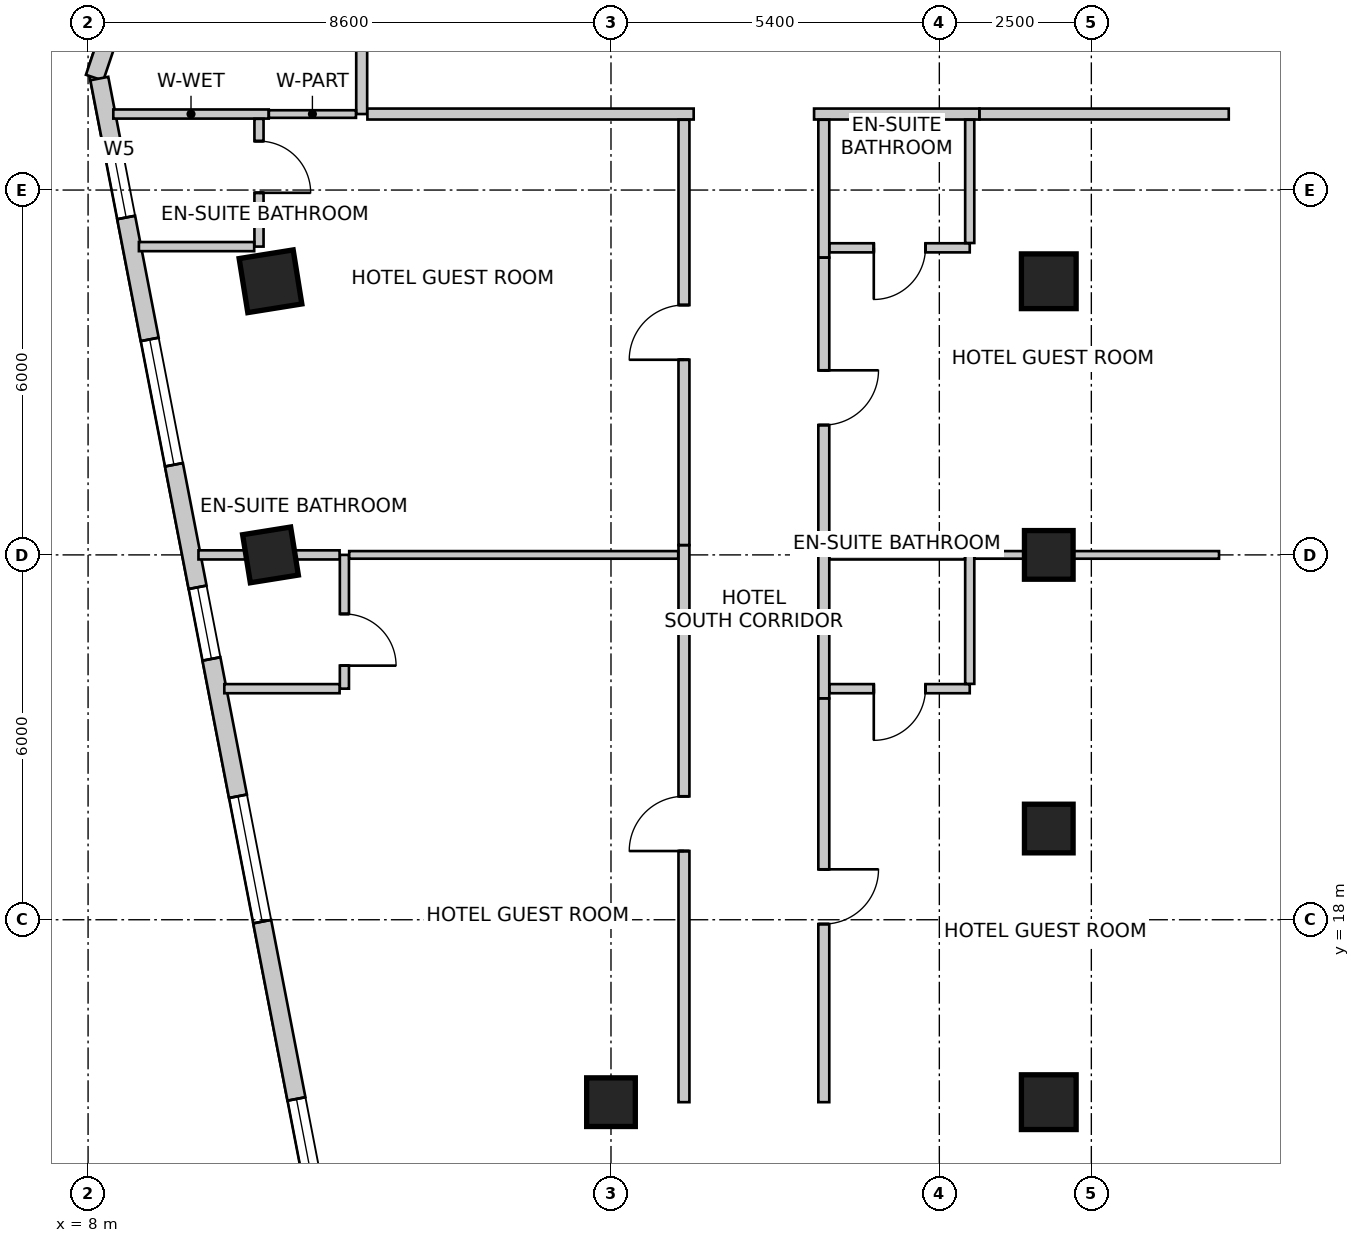
"""IFC4 building model, lengths in metres.
Left out: names, types, materials, properties, quantities, classifications, styles, units other than length and angle.
Written with IfcOpenShell. Run it as: python <this file> out.ifc"""

import sys

from ifc_helpers import new_model, si_unit, direction, frame, frame_2d, origin, origin_2d, place, context, subcontext, project, spatial, rectangle, extrude, source, transform, mapped, element, fill, save


model = new_model("IFC4")
c1 = context("Model", 3, precision=1e-05, world=origin(), true_north=direction((0.0, 1.0)))
c2 = subcontext(c1, "Body", "Model", "MODEL_VIEW")
j1 = project(units=[si_unit("LENGTHUNIT", "METRE"), si_unit("PLANEANGLEUNIT", "RADIAN")], contexts=[c1])
p1 = place(None, origin())
s1 = spatial("IfcSite", under=j1, at=p1, CompositionType="ELEMENT")
p2 = place(p1, origin())
s2 = spatial("IfcBuilding", under=s1, at=p2, CompositionType="ELEMENT")
p3 = place(p2, frame((0.0, 0.0, 110.6)))
s3 = spatial("IfcBuildingStorey", under=s2, at=p3, CompositionType="ELEMENT", Elevation=110.6)
m1 = source(origin(), c2, "Body", "SweptSolid", [
    extrude(rectangle(XDim=0.9, YDim=0.9, at=origin_2d()), origin(), (0.0, 0.0, 1.0), 3.6),
])
p4 = place(p3, frame((11.0, 28.5, 0.0), z_axis=(0.0, 0.0, 1.0), x_axis=(0.158158067254, -0.987413806751, 0.0)))
e1 = element("IfcColumn", 1, at=p4, inside=s3, PredefinedType="COLUMN", context=c2, shape_type="MappedRepresentation", body=[
    mapped(m1, transform((0.0, 0.0, 0.0), scale=1.0)),
])
m2 = source(origin(), c2, "Body", "SweptSolid", [
    extrude(rectangle(XDim=0.8, YDim=0.8, at=origin_2d()), origin(), (0.0, 0.0, 1.0), 3.6),
])
p5 = place(p3, frame((11.0, 24.0, 0.0), z_axis=(0.0, 0.0, 1.0), x_axis=(0.158158067254, -0.987413806751, 0.0)))
e2 = element("IfcColumn", 2, at=p5, inside=s3, PredefinedType="COLUMN", context=c2, shape_type="MappedRepresentation", body=[
    mapped(m2, transform((0.0, 0.0, 0.0), scale=1.0)),
])
p6 = place(p3, frame((23.8, 28.5, 0.0), z_axis=(0.0, 0.0, 1.0), x_axis=(1.0, 0.0, 0.0)))
e3 = element("IfcColumn", 3, at=p6, inside=s3, PredefinedType="COLUMN", context=c2, shape_type="MappedRepresentation", body=[
    mapped(m1, transform((0.0, 0.0, 0.0), scale=1.0)),
])
for number, where, z_axis, x_axis in (
    (4, (23.8, 24.0, 0.0), (0.0, 0.0, 1.0), (1.0, 0.0, 0.0)),
    (5, (23.8, 19.5, 0.0), (0.0, 0.0, 1.0), (1.0, 0.0, 0.0)),
):
    element("IfcColumn", number, at=place(p3, frame(where, z_axis=z_axis, x_axis=x_axis)), inside=s3, PredefinedType="COLUMN", context=c2, shape_type="MappedRepresentation", body=[
        mapped(m2, transform((0.0, 0.0, 0.0), scale=1.0)),
    ])
p7 = place(p3, frame((23.8, 15.0, 0.0), z_axis=(0.0, 0.0, 1.0), x_axis=(1.0, 0.0, 0.0)))
e6 = element("IfcColumn", 6, at=p7, inside=s3, PredefinedType="COLUMN", context=c2, shape_type="MappedRepresentation", body=[
    mapped(m1, transform((0.0, 0.0, 0.0), scale=1.0)),
])
p8 = place(p3, frame((16.6, 15.0, 0.0), z_axis=(0.0, 0.0, 1.0), x_axis=(1.0, 0.0, 0.0)))
e7 = element("IfcColumn", 7, at=p8, inside=s3, PredefinedType="COLUMN", context=c2, shape_type="MappedRepresentation", body=[
    mapped(m2, transform((0.0, 0.0, 0.0), scale=1.0)),
])
p9 = place(p3, frame((13.269, 47.134, 0.0), z_axis=(0.0, 0.0, 1.0), x_axis=(-0.319929596295, -0.947441319246, 0.0)))
e8 = element("IfcWall", 8, at=p9, inside=s3, PredefinedType="SOLIDWALL", context=c2, shape_type="SweptSolid", body=[
    extrude(rectangle(XDim=16.134, YDim=0.3, at=frame_2d((8.067, 0.0))), origin(), (0.0, 0.0, 1.0), 3.35),
])
m3 = source(origin(), c2, "Body", "SweptSolid", [
    extrude(rectangle(XDim=2.4, YDim=2.2, at=frame_2d((1.2, 1.1))), frame((0.0, 0.16, 0.0), z_axis=(0.0, -1.0, 0.0), x_axis=(1.0, 0.0, 0.0)), (0.0, 0.0, 1.0), 0.32),
])
p10 = place(p9, frame((2.276, 0.0, 0.85)))
e9 = element("IfcOpeningElement", 9, at=p10, cuts=e8, PredefinedType="OPENING", context=c2, shape_type="MappedRepresentation", body=[
    mapped(m3, transform((0.0, 0.0, 0.0), scale=1.0)),
])
m4 = source(origin(), c2, "Body", "SweptSolid", [
    extrude(rectangle(XDim=2.1, YDim=2.0, at=frame_2d((1.05, 1.0))), frame((0.0, 0.16, 0.0), z_axis=(0.0, -1.0, 0.0), x_axis=(1.0, 0.0, 0.0)), (0.0, 0.0, 1.0), 0.32),
])
p11 = place(p9, frame((7.361, 0.0, 0.85)))
e10 = element("IfcOpeningElement", 10, at=p11, cuts=e8, PredefinedType="OPENING", context=c2, shape_type="MappedRepresentation", body=[
    mapped(m4, transform((0.0, 0.0, 0.0), scale=1.0)),
])
p12 = place(p9, frame((12.147, 0.0, 0.85)))
e11 = element("IfcOpeningElement", 11, at=p12, cuts=e8, PredefinedType="OPENING", context=c2, shape_type="MappedRepresentation", body=[
    mapped(m3, transform((0.0, 0.0, 0.0), scale=1.0)),
])
p13 = place(p3, frame((8.185, 31.834, 0.0), z_axis=(0.0, 0.0, 1.0), x_axis=(0.189707113148, -0.981840725994, 0.0)))
e12 = element("IfcWall", 12, at=p13, inside=s3, PredefinedType="SOLIDWALL", context=c2, shape_type="SweptSolid", body=[
    extrude(rectangle(XDim=21.221, YDim=0.3, at=frame_2d((10.611, 0.0))), origin(), (0.0, 0.0, 1.0), 3.35),
])
m5 = source(origin(), c2, "Body", "SweptSolid", [
    extrude(rectangle(XDim=1.2, YDim=1.6, at=frame_2d((0.6, 0.8))), frame((0.0, 0.16, 0.0), z_axis=(0.0, -1.0, 0.0), x_axis=(1.0, 0.0, 0.0)), (0.0, 0.0, 1.0), 0.32),
])
p14 = place(p13, frame((1.127, 0.0, 0.85)))
e13 = element("IfcOpeningElement", 13, at=p14, cuts=e12, PredefinedType="OPENING", context=c2, shape_type="MappedRepresentation", body=[
    mapped(m5, transform((0.0, 0.0, 0.0), scale=1.0)),
])
p15 = place(p13, frame((4.369, 0.0, 0.85)))
e14 = element("IfcOpeningElement", 14, at=p15, cuts=e12, PredefinedType="OPENING", context=c2, shape_type="MappedRepresentation", body=[
    mapped(m4, transform((0.0, 0.0, 0.0), scale=1.0)),
])
p16 = place(p13, frame((8.521, 0.0, 0.85)))
e15 = element("IfcOpeningElement", 15, at=p16, cuts=e12, PredefinedType="OPENING", context=c2, shape_type="MappedRepresentation", body=[
    mapped(m5, transform((0.0, 0.0, 0.0), scale=1.0)),
])
p17 = place(p13, frame((12.021, 0.0, 0.85)))
e16 = element("IfcOpeningElement", 16, at=p17, cuts=e12, PredefinedType="OPENING", context=c2, shape_type="MappedRepresentation", body=[
    mapped(m4, transform((0.0, 0.0, 0.0), scale=1.0)),
])
p18 = place(p13, frame((17.091, 0.0, 0.85)))
e17 = element("IfcOpeningElement", 17, at=p18, cuts=e12, PredefinedType="OPENING", context=c2, shape_type="MappedRepresentation", body=[
    mapped(m3, transform((0.0, 0.0, 0.0), scale=1.0)),
])
p19 = place(p3, frame((12.5, 31.25, 0.0), z_axis=(0.0, 0.0, 1.0), x_axis=(0.0, 1.0, 0.0)))
e18 = element("IfcWall", 18, at=p19, inside=s3, PredefinedType="PARTITIONING", context=c2, shape_type="SweptSolid", body=[
    extrude(rectangle(XDim=2.2, YDim=0.18, at=frame_2d((1.1, 0.0))), origin(), (0.0, 0.0, 1.0), 3.034),
])
p20 = place(p3, frame((17.96, 31.25, 0.0), z_axis=(0.0, 0.0, 1.0), x_axis=(-1.0, 0.0, 0.0)))
e19 = element("IfcWall", 19, at=p20, inside=s3, PredefinedType="PARTITIONING", context=c2, shape_type="SweptSolid", body=[
    extrude(rectangle(XDim=5.366, YDim=0.18, at=frame_2d((2.683, 0.0))), origin(), (0.0, 0.0, 1.0), 3.034),
])
p21 = place(p3, frame((22.66, 31.25, 0.0), z_axis=(0.0, 0.0, 1.0), x_axis=(-1.0, 0.0, 0.0)))
e20 = element("IfcWall", 20, at=p21, inside=s3, PredefinedType="PARTITIONING", context=c2, shape_type="SweptSolid", body=[
    extrude(rectangle(XDim=2.72, YDim=0.18, at=frame_2d((1.36, 0.0))), origin(), (0.0, 0.0, 1.0), 3.034),
])
p22 = place(p3, frame((26.76, 31.25, 0.0), z_axis=(0.0, 0.0, 1.0), x_axis=(-1.0, 0.0, 0.0)))
e21 = element("IfcWall", 21, at=p22, inside=s3, PredefinedType="PARTITIONING", context=c2, shape_type="SweptSolid", body=[
    extrude(rectangle(XDim=4.098, YDim=0.18, at=frame_2d((2.049, 0.0))), origin(), (0.0, 0.0, 1.0), 3.35),
])
p23 = place(p3, frame((10.971, 31.25, 0.0), z_axis=(0.0, 0.0, 1.0), x_axis=(-1.0, 0.0, 0.0)))
e22 = element("IfcWall", 22, at=p23, inside=s3, PredefinedType="PARTITIONING", context=c2, shape_type="SweptSolid", body=[
    extrude(rectangle(XDim=2.556, YDim=0.15, at=frame_2d((1.278, 0.0))), origin(), (0.0, 0.0, 1.0), 2.492),
])
p24 = place(p3, frame((12.406, 31.25, 0.0), z_axis=(0.0, 0.0, 1.0), x_axis=(-1.0, 0.0, 0.0)))
e23 = element("IfcWall", 23, at=p24, inside=s3, PredefinedType="PARTITIONING", context=c2, shape_type="SweptSolid", body=[
    extrude(rectangle(XDim=1.433, YDim=0.125, at=frame_2d((0.717, 0.0))), origin(), (0.0, 0.0, 1.0), 2.492),
])
p25 = place(p3, frame((17.8, 15.0, 0.0), z_axis=(0.0, 0.0, 1.0), x_axis=(0.0, 1.0, 0.0)))
e24 = element("IfcWall", 24, at=p25, inside=s3, PredefinedType="PARTITIONING", context=c2, shape_type="SweptSolid", body=[
    extrude(rectangle(XDim=9.16, YDim=0.18, at=frame_2d((4.58, 0.0))), origin(), (0.0, 0.0, 1.0), 2.492),
])
m6 = source(origin(), c2, "Body", "SweptSolid", [
    extrude(rectangle(XDim=0.9, YDim=2.15, at=frame_2d((0.45, 1.075))), frame((0.0, 0.1, 0.0), z_axis=(0.0, -1.0, 0.0), x_axis=(1.0, 0.0, 0.0)), (0.0, 0.0, 1.0), 0.2),
])
p26 = place(p25, frame((4.13, 0.0, 0.0)))
e25 = element("IfcOpeningElement", 25, at=p26, cuts=e24, PredefinedType="OPENING", context=c2, shape_type="MappedRepresentation", body=[
    mapped(m6, transform((0.0, 0.0, 0.0), scale=1.0)),
])
p27 = place(p3, frame((20.1, 24.16, 0.0), z_axis=(0.0, 0.0, 1.0), x_axis=(0.0, -1.0, 0.0)))
e26 = element("IfcWall", 26, at=p27, inside=s3, PredefinedType="PARTITIONING", context=c2, shape_type="SweptSolid", body=[
    extrude(rectangle(XDim=2.52, YDim=0.18, at=frame_2d((1.26, 0.0))), origin(), (0.0, 0.0, 1.0), 2.803),
])
p28 = place(p3, frame((20.1, 21.638, 0.0), z_axis=(0.0, 0.0, 1.0), x_axis=(0.0, -1.0, 0.0)))
e27 = element("IfcWall", 27, at=p28, inside=s3, PredefinedType="PARTITIONING", context=c2, shape_type="SweptSolid", body=[
    extrude(rectangle(XDim=6.638, YDim=0.18, at=frame_2d((3.319, 0.0))), origin(), (0.0, 0.0, 1.0), 2.492),
])
p29 = place(p28, frame((2.809, 0.0, 0.0)))
e28 = element("IfcOpeningElement", 28, at=p29, cuts=e27, PredefinedType="OPENING", context=c2, shape_type="MappedRepresentation", body=[
    mapped(m6, transform((0.0, 0.0, 0.0), scale=1.0)),
])
p30 = place(p3, frame((17.8, 24.162, 0.0), z_axis=(0.0, 0.0, 1.0), x_axis=(0.0, 1.0, 0.0)))
e29 = element("IfcWall", 29, at=p30, inside=s3, PredefinedType="PARTITIONING", context=c2, shape_type="SweptSolid", body=[
    extrude(rectangle(XDim=6.994, YDim=0.18, at=frame_2d((3.497, 0.0))), origin(), (0.0, 0.0, 1.0), 2.803),
])
p31 = place(p30, frame((3.047, 0.0, 0.0)))
e30 = element("IfcOpeningElement", 30, at=p31, cuts=e29, PredefinedType="OPENING", context=c2, shape_type="MappedRepresentation", body=[
    mapped(m6, transform((0.0, 0.0, 0.0), scale=1.0)),
])
p32 = place(p3, frame((20.1, 31.156, 0.0), z_axis=(0.0, 0.0, 1.0), x_axis=(0.0, -1.0, 0.0)))
e31 = element("IfcWall", 31, at=p32, inside=s3, PredefinedType="PARTITIONING", context=c2, shape_type="SweptSolid", body=[
    extrude(rectangle(XDim=2.266, YDim=0.18, at=frame_2d((1.133, 0.0))), origin(), (0.0, 0.0, 1.0), 3.034),
])
p33 = place(p3, frame((20.1, 28.888, 0.0), z_axis=(0.0, 0.0, 1.0), x_axis=(0.0, -1.0, 0.0)))
e32 = element("IfcWall", 32, at=p33, inside=s3, PredefinedType="PARTITIONING", context=c2, shape_type="SweptSolid", body=[
    extrude(rectangle(XDim=4.726, YDim=0.18, at=frame_2d((2.363, 0.0))), origin(), (0.0, 0.0, 1.0), 2.803),
])
p34 = place(p33, frame((1.853, 0.0, 0.0)))
e33 = element("IfcOpeningElement", 33, at=p34, cuts=e32, PredefinedType="OPENING", context=c2, shape_type="MappedRepresentation", body=[
    mapped(m6, transform((0.0, 0.0, 0.0), scale=1.0)),
])
p35 = place(p3, frame((12.216, 24.0, 0.0), z_axis=(0.0, 0.0, 1.0), x_axis=(0.0, -1.0, 0.0)))
e34 = element("IfcWall", 34, at=p35, inside=s3, PredefinedType="PARTITIONING", context=c2, shape_type="SweptSolid", body=[
    extrude(rectangle(XDim=2.2, YDim=0.15, at=frame_2d((1.1, 0.0))), origin(), (0.0, 0.0, 1.0), 2.803),
])
m7 = source(origin(), c2, "Body", "SweptSolid", [
    extrude(rectangle(XDim=0.85, YDim=2.15, at=frame_2d((0.425, 1.075))), frame((0.0, 0.085, 0.0), z_axis=(0.0, -1.0, 0.0), x_axis=(1.0, 0.0, 0.0)), (0.0, 0.0, 1.0), 0.17),
])
p36 = place(p35, frame((0.971, 0.0, 0.0)))
e35 = element("IfcOpeningElement", 35, at=p36, cuts=e34, PredefinedType="OPENING", context=c2, shape_type="MappedRepresentation", body=[
    mapped(m7, transform((0.0, 0.0, 0.0), scale=1.0)),
])
p37 = place(p3, frame((12.137, 21.8, 0.0), z_axis=(0.0, 0.0, 1.0), x_axis=(-1.0, 0.0, 0.0)))
e36 = element("IfcWall", 36, at=p37, inside=s3, PredefinedType="PARTITIONING", context=c2, shape_type="SweptSolid", body=[
    extrude(rectangle(XDim=1.896, YDim=0.15, at=frame_2d((0.948, 0.0))), origin(), (0.0, 0.0, 1.0), 3.35),
])
p38 = place(p3, frame((9.816, 24.0, 0.0), z_axis=(0.0, 0.0, 1.0), x_axis=(1.0, 0.0, 0.0)))
e37 = element("IfcWall", 37, at=p38, inside=s3, PredefinedType="PARTITIONING", context=c2, shape_type="SweptSolid", body=[
    extrude(rectangle(XDim=2.321, YDim=0.15, at=frame_2d((1.161, 0.0))), origin(), (0.0, 0.0, 1.0), 2.492),
])
p39 = place(p3, frame((12.295, 24.0, 0.0), z_axis=(0.0, 0.0, 1.0), x_axis=(1.0, 0.0, 0.0)))
e38 = element("IfcWall", 38, at=p39, inside=s3, PredefinedType="PARTITIONING", context=c2, shape_type="SweptSolid", body=[
    extrude(rectangle(XDim=5.411, YDim=0.125, at=frame_2d((2.706, 0.0))), origin(), (0.0, 0.0, 1.0), 2.803),
])
p40 = place(p3, frame((22.5, 21.8, 0.0), z_axis=(0.0, 0.0, 1.0), x_axis=(-1.0, 0.0, 0.0)))
e39 = element("IfcWall", 39, at=p40, inside=s3, PredefinedType="PARTITIONING", context=c2, shape_type="SweptSolid", body=[
    extrude(rectangle(XDim=2.306, YDim=0.15, at=frame_2d((1.153, 0.0))), origin(), (0.0, 0.0, 1.0), 3.35),
])
p41 = place(p40, frame((0.728, 0.0, 0.0)))
e40 = element("IfcOpeningElement", 40, at=p41, cuts=e39, PredefinedType="OPENING", context=c2, shape_type="MappedRepresentation", body=[
    mapped(m7, transform((0.0, 0.0, 0.0), scale=1.0)),
])
p42 = place(p3, frame((22.5, 24.0, 0.0), z_axis=(0.0, 0.0, 1.0), x_axis=(0.0, -1.0, 0.0)))
e41 = element("IfcWall", 41, at=p42, inside=s3, PredefinedType="PARTITIONING", context=c2, shape_type="SweptSolid", body=[
    extrude(rectangle(XDim=2.121, YDim=0.15, at=frame_2d((1.061, 0.0))), origin(), (0.0, 0.0, 1.0), 2.803),
])
p43 = place(p3, frame((20.194, 24.0, 0.0), z_axis=(0.0, 0.0, 1.0), x_axis=(1.0, 0.0, 0.0)))
e42 = element("IfcWall", 42, at=p43, inside=s3, PredefinedType="PARTITIONING", context=c2, shape_type="SweptSolid", body=[
    extrude(rectangle(XDim=2.227, YDim=0.15, at=frame_2d((1.113, 0.0))), origin(), (0.0, 0.0, 1.0), 2.803),
])
p44 = place(p3, frame((22.579, 24.0, 0.0), z_axis=(0.0, 0.0, 1.0), x_axis=(1.0, 0.0, 0.0)))
e43 = element("IfcWall", 43, at=p44, inside=s3, PredefinedType="PARTITIONING", context=c2, shape_type="SweptSolid", body=[
    extrude(rectangle(XDim=4.021, YDim=0.125, at=frame_2d((2.01, 0.0))), origin(), (0.0, 0.0, 1.0), 2.492),
])
p45 = place(p3, frame((10.811, 31.171, 0.0), z_axis=(0.0, 0.0, 1.0), x_axis=(0.0, -1.0, 0.0)))
e44 = element("IfcWall", 44, at=p45, inside=s3, PredefinedType="PARTITIONING", context=c2, shape_type="SweptSolid", body=[
    extrude(rectangle(XDim=2.101, YDim=0.15, at=frame_2d((1.05, 0.0))), origin(), (0.0, 0.0, 1.0), 2.492),
])
p46 = place(p45, frame((0.366, 0.0, 0.0)))
e45 = element("IfcOpeningElement", 45, at=p46, cuts=e44, PredefinedType="OPENING", context=c2, shape_type="MappedRepresentation", body=[
    mapped(m7, transform((0.0, 0.0, 0.0), scale=1.0)),
])
p47 = place(p3, frame((10.732, 29.07, 0.0), z_axis=(0.0, 0.0, 1.0), x_axis=(-1.0, 0.0, 0.0)))
e46 = element("IfcWall", 46, at=p47, inside=s3, PredefinedType="PARTITIONING", context=c2, shape_type="SweptSolid", body=[
    extrude(rectangle(XDim=1.896, YDim=0.15, at=frame_2d((0.948, 0.0))), origin(), (0.0, 0.0, 1.0), 3.35),
])
p48 = place(p3, frame((22.5, 29.05, 0.0), z_axis=(0.0, 0.0, 1.0), x_axis=(-1.0, 0.0, 0.0)))
e47 = element("IfcWall", 47, at=p48, inside=s3, PredefinedType="PARTITIONING", context=c2, shape_type="SweptSolid", body=[
    extrude(rectangle(XDim=2.306, YDim=0.15, at=frame_2d((1.153, 0.0))), origin(), (0.0, 0.0, 1.0), 3.034),
])
p49 = place(p48, frame((0.728, 0.0, 0.0)))
e48 = element("IfcOpeningElement", 48, at=p49, cuts=e47, PredefinedType="OPENING", context=c2, shape_type="MappedRepresentation", body=[
    mapped(m7, transform((0.0, 0.0, 0.0), scale=1.0)),
])
p50 = place(p3, frame((22.5, 31.156, 0.0), z_axis=(0.0, 0.0, 1.0), x_axis=(0.0, -1.0, 0.0)))
e49 = element("IfcWall", 49, at=p50, inside=s3, PredefinedType="PARTITIONING", context=c2, shape_type="SweptSolid", body=[
    extrude(rectangle(XDim=2.027, YDim=0.15, at=frame_2d((1.014, 0.0))), origin(), (0.0, 0.0, 1.0), 3.034),
])
m8 = source(origin(), c2, "Body", "SweptSolid", [
    extrude(rectangle(XDim=1.2, YDim=1.6, at=frame_2d((0.6, 0.8))), frame((0.0, -0.015, 0.0), z_axis=(0.0, -1.0, 0.0), x_axis=(1.0, 0.0, 0.0)), (0.0, 0.0, 1.0), 0.06),
])
p51 = place(p14, origin())
e50 = element("IfcWindow", 50, at=p51, inside=s3, PartitioningType="SINGLE_PANEL", PredefinedType="WINDOW", context=c2, shape_type="MappedRepresentation", body=[
    mapped(m8, transform((0.0, 0.0, 0.0), scale=1.0)),
])
fill(e13, e50)
m9 = source(origin(), c2, "Body", "SweptSolid", [
    extrude(rectangle(XDim=2.1, YDim=2.0, at=frame_2d((1.05, 1.0))), frame((0.0, -0.015, 0.0), z_axis=(0.0, -1.0, 0.0), x_axis=(1.0, 0.0, 0.0)), (0.0, 0.0, 1.0), 0.06),
])
p52 = place(p15, origin())
e51 = element("IfcWindow", 51, at=p52, inside=s3, PartitioningType="SINGLE_PANEL", PredefinedType="WINDOW", context=c2, shape_type="MappedRepresentation", body=[
    mapped(m9, transform((0.0, 0.0, 0.0), scale=1.0)),
])
fill(e14, e51)
p53 = place(p16, origin())
e52 = element("IfcWindow", 52, at=p53, inside=s3, PartitioningType="SINGLE_PANEL", PredefinedType="WINDOW", context=c2, shape_type="MappedRepresentation", body=[
    mapped(m8, transform((0.0, 0.0, 0.0), scale=1.0)),
])
fill(e15, e52)
p54 = place(p17, origin())
e53 = element("IfcWindow", 53, at=p54, inside=s3, PartitioningType="SINGLE_PANEL", PredefinedType="WINDOW", context=c2, shape_type="MappedRepresentation", body=[
    mapped(m9, transform((0.0, 0.0, 0.0), scale=1.0)),
])
fill(e16, e53)
m10 = source(origin(), c2, "Body", "SweptSolid", [
    extrude(rectangle(XDim=2.4, YDim=2.2, at=frame_2d((1.2, 1.1))), frame((0.0, -0.015, 0.0), z_axis=(0.0, -1.0, 0.0), x_axis=(1.0, 0.0, 0.0)), (0.0, 0.0, 1.0), 0.06),
])
p55 = place(p18, origin())
e54 = element("IfcWindow", 54, at=p55, inside=s3, PartitioningType="SINGLE_PANEL", PredefinedType="WINDOW", context=c2, shape_type="MappedRepresentation", body=[
    mapped(m10, transform((0.0, 0.0, 0.0), scale=1.0)),
])
fill(e17, e54)
m11 = source(origin(), c2, "Body", "SweptSolid", [
    extrude(rectangle(XDim=0.85, YDim=2.15, at=frame_2d((0.425, 1.075))), frame((0.0, 0.025, 0.0), z_axis=(0.0, -1.0, 0.0), x_axis=(1.0, 0.0, 0.0)), (0.0, 0.0, 1.0), 0.05),
])
p56 = place(p36, origin())
e55 = element("IfcDoor", 55, at=p56, inside=s3, OperationType="SINGLE_SWING_RIGHT", PredefinedType="DOOR", context=c2, shape_type="MappedRepresentation", body=[
    mapped(m11, transform((0.0, 0.0, 0.0), scale=1.0)),
])
fill(e35, e55)
m12 = source(origin(), c2, "Body", "SweptSolid", [
    extrude(rectangle(XDim=0.9, YDim=2.15, at=frame_2d((0.45, 1.075))), frame((0.0, 0.025, 0.0), z_axis=(0.0, -1.0, 0.0), x_axis=(1.0, 0.0, 0.0)), (0.0, 0.0, 1.0), 0.05),
])
p57 = place(p26, origin())
e56 = element("IfcDoor", 56, at=p57, inside=s3, OperationType="SINGLE_SWING_LEFT", PredefinedType="DOOR", context=c2, shape_type="MappedRepresentation", body=[
    mapped(m12, transform((0.0, 0.0, 0.0), scale=1.0)),
])
fill(e25, e56)
p58 = place(p41, origin())
e57 = element("IfcDoor", 57, at=p58, inside=s3, OperationType="SINGLE_SWING_RIGHT", PredefinedType="DOOR", context=c2, shape_type="MappedRepresentation", body=[
    mapped(m11, transform((0.0, 0.0, 0.0), scale=1.0)),
])
fill(e40, e57)
p59 = place(p29, origin())
e58 = element("IfcDoor", 58, at=p59, inside=s3, OperationType="SINGLE_SWING_LEFT", PredefinedType="DOOR", context=c2, shape_type="MappedRepresentation", body=[
    mapped(m12, transform((0.0, 0.0, 0.0), scale=1.0)),
])
fill(e28, e58)
p60 = place(p46, origin())
e59 = element("IfcDoor", 59, at=p60, inside=s3, OperationType="SINGLE_SWING_RIGHT", PredefinedType="DOOR", context=c2, shape_type="MappedRepresentation", body=[
    mapped(m11, transform((0.0, 0.0, 0.0), scale=1.0)),
])
fill(e45, e59)
p61 = place(p31, origin())
e60 = element("IfcDoor", 60, at=p61, inside=s3, OperationType="SINGLE_SWING_LEFT", PredefinedType="DOOR", context=c2, shape_type="MappedRepresentation", body=[
    mapped(m12, transform((0.0, 0.0, 0.0), scale=1.0)),
])
fill(e30, e60)
p62 = place(p49, origin())
e61 = element("IfcDoor", 61, at=p62, inside=s3, OperationType="SINGLE_SWING_RIGHT", PredefinedType="DOOR", context=c2, shape_type="MappedRepresentation", body=[
    mapped(m11, transform((0.0, 0.0, 0.0), scale=1.0)),
])
fill(e48, e61)
p63 = place(p34, origin())
e62 = element("IfcDoor", 62, at=p63, inside=s3, OperationType="SINGLE_SWING_LEFT", PredefinedType="DOOR", context=c2, shape_type="MappedRepresentation", body=[
    mapped(m12, transform((0.0, 0.0, 0.0), scale=1.0)),
])
fill(e33, e62)
save(model, sys.argv[1])
